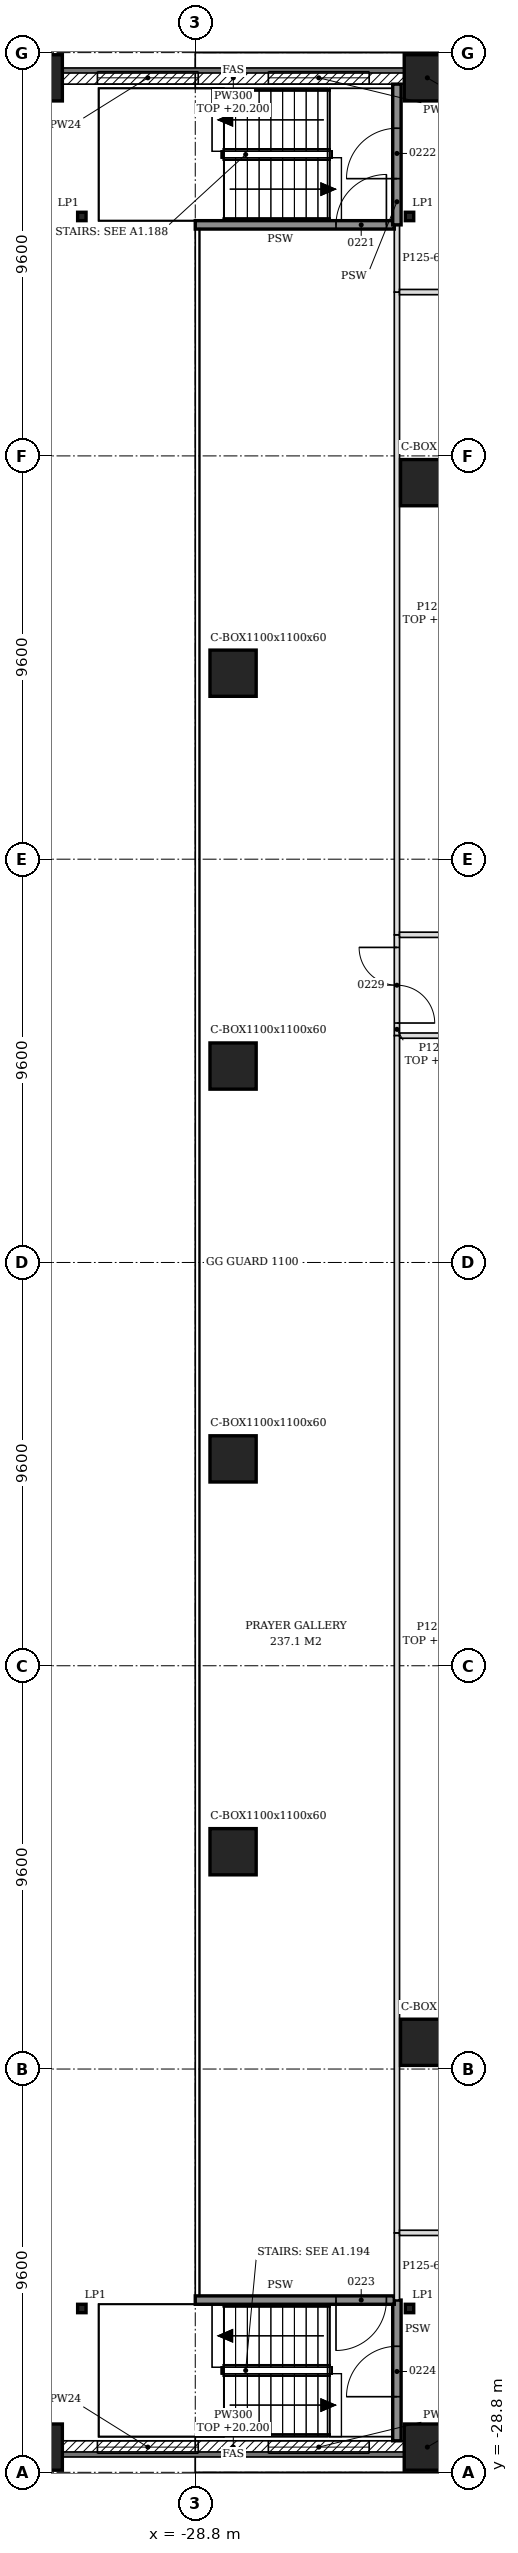
"""IFC4 building model, lengths in metres.
Left out: names, types, materials, properties, quantities, classifications, styles, units other than length and angle.
Written with IfcOpenShell. Run it as: python <this file> out.ifc"""

import sys

from ifc_helpers import new_model, si_unit, direction, frame, frame_2d, origin, origin_2d, place, context, subcontext, project, spatial, polyline, rectangle, hollow_rectangle, i_section, outline, extrude, element, fill, save


model = new_model("IFC4")
c1 = context("Model", 3, precision=1e-05, world=origin(), true_north=direction((0.0, 1.0)))
c2 = subcontext(c1, "Body", "Model", "MODEL_VIEW")
j1 = project(units=[si_unit("LENGTHUNIT", "METRE"), si_unit("PLANEANGLEUNIT", "RADIAN")], contexts=[c1])
p1 = place(None, origin())
s1 = spatial("IfcSite", under=j1, at=p1, CompositionType="ELEMENT")
p2 = place(p1, origin())
s2 = spatial("IfcBuilding", under=s1, at=p2, CompositionType="ELEMENT")
p3 = place(p2, frame((0.0, 0.0, 15.0)))
s3 = spatial("IfcBuildingStorey", under=s2, at=p3, CompositionType="ELEMENT", Elevation=15.0)
for number, where, z_axis, x_axis in (
    (1, (-32.514, -28.2, 0.0), (0.0, 0.0, 1.0), (1.0, 0.0, 0.0)),
    (2, (-23.276, -28.2, 0.0), (0.0, 0.0, 1.0), (1.0, 0.0, 0.0)),
    (3, (-23.276, 28.2, 0.0), (0.0, 0.0, 1.0), (1.0, 0.0, 0.0)),
    (4, (-32.514, 28.2, 0.0), (0.0, 0.0, 1.0), (1.0, 0.0, 0.0)),
):
    element("IfcColumn", number, at=place(p3, frame(where, z_axis=z_axis, x_axis=x_axis)), inside=s3, PredefinedType="COLUMN", context=c2, shape_type="SweptSolid", body=[
        extrude(hollow_rectangle(XDim=1.1, YDim=1.1, WallThickness=0.06, at=origin_2d()), origin(), (0.0, 0.0, 1.0), 6.0),
    ])
p4 = place(p3, frame((-31.5, 24.9, 0.0), z_axis=(0.0, 0.0, 1.0), x_axis=(1.0, 0.0, 0.0)))
e5 = element("IfcColumn", 5, at=p4, inside=s3, PredefinedType="COLUMN", context=c2, shape_type="SweptSolid", body=[
    extrude(i_section(OverallWidth=0.2, OverallDepth=0.2, WebThickness=0.009, FlangeThickness=0.015, FilletRadius=0.018, at=origin_2d()), origin(), (0.0, 0.0, 1.0), 6.0),
])
p5 = place(p3, frame((-23.7, 24.9, 0.0), z_axis=(0.0, 0.0, 1.0), x_axis=(1.0, 0.0, 0.0)))
e6 = element("IfcColumn", 6, at=p5, inside=s3, PredefinedType="COLUMN", context=c2, shape_type="SweptSolid", body=[
    extrude(i_section(OverallWidth=0.2, OverallDepth=0.2, WebThickness=0.009, FlangeThickness=0.015, FilletRadius=0.018, at=origin_2d()), origin(), (0.0, 0.0, 1.0), 2.8),
])
p6 = place(p3, frame((-31.5, -24.9, 0.0), z_axis=(0.0, 0.0, 1.0), x_axis=(1.0, 0.0, 0.0)))
e7 = element("IfcColumn", 7, at=p6, inside=s3, PredefinedType="COLUMN", context=c2, shape_type="SweptSolid", body=[
    extrude(i_section(OverallWidth=0.2, OverallDepth=0.2, WebThickness=0.009, FlangeThickness=0.015, FilletRadius=0.018, at=origin_2d()), origin(), (0.0, 0.0, 1.0), 6.0),
])
p7 = place(p3, frame((-23.7, -24.9, 0.0), z_axis=(0.0, 0.0, 1.0), x_axis=(1.0, 0.0, 0.0)))
e8 = element("IfcColumn", 8, at=p7, inside=s3, PredefinedType="COLUMN", context=c2, shape_type="SweptSolid", body=[
    extrude(i_section(OverallWidth=0.2, OverallDepth=0.2, WebThickness=0.009, FlangeThickness=0.015, FilletRadius=0.018, at=origin_2d()), origin(), (0.0, 0.0, 1.0), 2.8),
])
for number, where, z_axis, x_axis in (
    (9, (-23.364, 18.564, -0.2), (0.0, 0.0, 1.0), (1.0, 0.0, 0.0)),
    (10, (-27.9, 14.027, -0.2), (0.0, 0.0, 1.0), (1.0, 0.0, 0.0)),
    (11, (-27.9, 4.676, -0.2), (0.0, 0.0, 1.0), (1.0, 0.0, 0.0)),
    (12, (-27.9, -4.676, -0.2), (0.0, 0.0, 1.0), (1.0, 0.0, 0.0)),
    (13, (-27.9, -14.027, -0.2), (0.0, 0.0, 1.0), (1.0, 0.0, 0.0)),
    (14, (-23.364, -18.564, -0.2), (0.0, 0.0, 1.0), (1.0, 0.0, 0.0)),
):
    element("IfcColumn", number, at=place(p3, frame(where, z_axis=z_axis, x_axis=x_axis)), inside=s3, PredefinedType="COLUMN", context=c2, shape_type="SweptSolid", body=[
        extrude(hollow_rectangle(XDim=1.1, YDim=1.1, WallThickness=0.06, at=origin_2d()), origin(), (0.0, 0.0, 1.0), 6.0),
    ])
p8 = place(p3, frame((-31.964, -28.2, 0.0), z_axis=(0.0, 0.0, 1.0), x_axis=(1.0, 0.0, 0.0)))
e15 = element("IfcWall", 15, at=p8, inside=s3, PredefinedType="SOLIDWALL", context=c2, shape_type="SweptSolid", body=[
    extrude(rectangle(XDim=8.138, YDim=0.3, at=frame_2d((4.069, 0.0))), origin(), (0.0, 0.0, 1.0), 5.2),
])
p9 = place(p8, frame((0.834, 0.0, 0.9)))
e16 = element("IfcOpeningElement", 16, at=p9, cuts=e15, PredefinedType="OPENING", context=c2, shape_type="SweptSolid", body=[
    extrude(rectangle(XDim=2.4, YDim=2.4, at=frame_2d((1.2, 1.2))), frame((0.0, 0.16, 0.0), z_axis=(0.0, -1.0, 0.0), x_axis=(1.0, 0.0, 0.0)), (0.0, 0.0, 1.0), 0.32),
])
p10 = place(p8, frame((4.903, 0.0, 0.9)))
e17 = element("IfcOpeningElement", 17, at=p10, cuts=e15, PredefinedType="OPENING", context=c2, shape_type="SweptSolid", body=[
    extrude(rectangle(XDim=2.4, YDim=2.4, at=frame_2d((1.2, 1.2))), frame((0.0, 0.16, 0.0), z_axis=(0.0, -1.0, 0.0), x_axis=(1.0, 0.0, 0.0)), (0.0, 0.0, 1.0), 0.32),
])
p11 = place(p3, frame((-23.826, 28.2, 0.0), z_axis=(0.0, 0.0, 1.0), x_axis=(-1.0, 0.0, 0.0)))
e18 = element("IfcWall", 18, at=p11, inside=s3, PredefinedType="SOLIDWALL", context=c2, shape_type="SweptSolid", body=[
    extrude(rectangle(XDim=8.138, YDim=0.3, at=frame_2d((4.069, 0.0))), origin(), (0.0, 0.0, 1.0), 5.2),
])
p12 = place(p11, frame((0.834, 0.0, 0.9)))
e19 = element("IfcOpeningElement", 19, at=p12, cuts=e18, PredefinedType="OPENING", context=c2, shape_type="SweptSolid", body=[
    extrude(rectangle(XDim=2.4, YDim=2.4, at=frame_2d((1.2, 1.2))), frame((0.0, 0.16, 0.0), z_axis=(0.0, -1.0, 0.0), x_axis=(1.0, 0.0, 0.0)), (0.0, 0.0, 1.0), 0.32),
])
p13 = place(p11, frame((4.903, 0.0, 0.9)))
e20 = element("IfcOpeningElement", 20, at=p13, cuts=e18, PredefinedType="OPENING", context=c2, shape_type="SweptSolid", body=[
    extrude(rectangle(XDim=2.4, YDim=2.4, at=frame_2d((1.2, 1.2))), frame((0.0, 0.16, 0.0), z_axis=(0.0, -1.0, 0.0), x_axis=(1.0, 0.0, 0.0)), (0.0, 0.0, 1.0), 0.32),
])
p14 = place(p2, frame((0.0, 0.0, 9.0)))
s4 = spatial("IfcBuildingStorey", under=s2, at=p14, CompositionType="ELEMENT", Elevation=9.0)
p15 = place(p14, frame((-31.2, -28.05, 0.0), z_axis=(0.0, 0.0, 1.0), x_axis=(0.0, 1.0, 0.0)))
e21 = element("IfcWall", 21, at=p15, inside=s4, PredefinedType="SOLIDWALL", context=c2, shape_type="SweptSolid", body=[
    extrude(rectangle(XDim=3.25, YDim=0.2, at=frame_2d((1.625, 0.0))), origin(), (0.0, 0.0, 1.0), 11.8),
])
for number, where, z_axis, x_axis in (
    (22, (-31.3, -24.7, 0.0), (0.0, 0.0, 1.0), (1.0, 0.0, 0.0)),
    (23, (-31.3, 24.7, 0.0), (0.0, 0.0, 1.0), (1.0, 0.0, 0.0)),
):
    element("IfcWall", number, at=place(p14, frame(where, z_axis=z_axis, x_axis=x_axis)), inside=s4, PredefinedType="SOLIDWALL", context=c2, shape_type="SweptSolid", body=[
        extrude(rectangle(XDim=2.5, YDim=0.2, at=frame_2d((1.25, 0.0))), origin(), (0.0, 0.0, 1.0), 11.8),
    ])
p16 = place(p14, frame((-31.2, 24.8, 0.0), z_axis=(0.0, 0.0, 1.0), x_axis=(0.0, 1.0, 0.0)))
e24 = element("IfcWall", 24, at=p16, inside=s4, PredefinedType="SOLIDWALL", context=c2, shape_type="SweptSolid", body=[
    extrude(rectangle(XDim=3.25, YDim=0.2, at=frame_2d((1.625, 0.0))), origin(), (0.0, 0.0, 1.0), 11.8),
])
p17 = place(p3, frame((-24.0, -28.05, 0.0), z_axis=(0.0, 0.0, 1.0), x_axis=(0.0, 1.0, 0.0)))
e25 = element("IfcWall", 25, at=p17, inside=s3, PredefinedType="SOLIDWALL", context=c2, shape_type="SweptSolid", body=[
    extrude(rectangle(XDim=3.35, YDim=0.2, at=frame_2d((1.675, 0.0))), origin(), (0.0, 0.0, 1.0), 5.8),
])
p18 = place(p17, frame((1.05, 0.0, 0.0)))
e26 = element("IfcOpeningElement", 26, at=p18, cuts=e25, PredefinedType="OPENING", context=c2, shape_type="SweptSolid", body=[
    extrude(rectangle(XDim=1.2, YDim=2.1, at=frame_2d((0.6, 1.05))), frame((0.0, 0.11, 0.0), z_axis=(0.0, -1.0, 0.0), x_axis=(1.0, 0.0, 0.0)), (0.0, 0.0, 1.0), 0.22),
])
p19 = place(p3, frame((-28.8, -24.7, 0.0), z_axis=(0.0, 0.0, 1.0), x_axis=(1.0, 0.0, 0.0)))
e27 = element("IfcWall", 27, at=p19, inside=s3, PredefinedType="SOLIDWALL", context=c2, shape_type="SweptSolid", body=[
    extrude(rectangle(XDim=4.738, YDim=0.2, at=frame_2d((2.369, 0.0))), origin(), (0.0, 0.0, 1.0), 5.8),
])
p20 = place(p19, frame((3.35, 0.0, 0.0)))
e28 = element("IfcOpeningElement", 28, at=p20, cuts=e27, PredefinedType="OPENING", context=c2, shape_type="SweptSolid", body=[
    extrude(rectangle(XDim=1.2, YDim=2.1, at=frame_2d((0.6, 1.05))), frame((0.0, 0.11, 0.0), z_axis=(0.0, -1.0, 0.0), x_axis=(1.0, 0.0, 0.0)), (0.0, 0.0, 1.0), 0.22),
])
p21 = place(p3, frame((-24.0, -24.7, 0.0), z_axis=(0.0, 0.0, 1.0), x_axis=(0.0, 1.0, 0.0)))
e29 = element("IfcWall", 29, at=p21, inside=s3, PredefinedType="PARTITIONING", context=c2, shape_type="SweptSolid", body=[
    extrude(rectangle(XDim=1.6, YDim=0.125, at=frame_2d((0.8, 0.0))), origin(), (0.0, 0.0, 1.0), 5.8),
])
p22 = place(p3, frame((-24.0, -23.1, 0.0), z_axis=(0.0, 0.0, 1.0), x_axis=(0.0, 1.0, 0.0)))
e30 = element("IfcWall", 30, at=p22, inside=s3, PredefinedType="PARTITIONING", context=c2, shape_type="SweptSolid", body=[
    extrude(outline(polyline([(0.0, 0.0), (28.5, 0.0), (28.5, 5.28), (23.25, 5.28), (23.248, 5.08), (22.95, 5.08), (22.948, 5.28), (13.65, 5.28), (13.648, 5.08), (13.35, 5.08), (13.348, 5.28), (4.05, 5.28), (4.048, 5.18), (3.75, 5.18), (3.748, 5.28), (0.0, 5.28), (0.0, 0.0)])), frame((0.0, 0.062, 0.0), z_axis=(0.0, -1.0, 0.0), x_axis=(1.0, 0.0, 0.0)), (0.0, 0.0, 1.0), 0.125),
])
p23 = place(p3, frame((-23.938, -23.1, 0.0), z_axis=(0.0, 0.0, 1.0), x_axis=(1.0, 0.0, 0.0)))
e31 = element("IfcWall", 31, at=p23, inside=s3, PredefinedType="PARTITIONING", context=c2, shape_type="SweptSolid", body=[
    extrude(rectangle(XDim=4.56, YDim=0.125, at=frame_2d((2.28, 0.0))), origin(), (0.0, 0.0, 1.0), 5.8),
])
p24 = place(p3, frame((-24.0, 5.4, 0.0), z_axis=(0.0, 0.0, 1.0), x_axis=(0.0, 1.0, 0.0)))
e32 = element("IfcWall", 32, at=p24, inside=s3, PredefinedType="PARTITIONING", context=c2, shape_type="SweptSolid", body=[
    extrude(rectangle(XDim=2.4, YDim=0.125, at=frame_2d((1.2, 0.0))), origin(), (0.0, 0.0, 1.0), 5.28),
])
p25 = place(p24, frame((0.3, 0.0, 0.0)))
e33 = element("IfcOpeningElement", 33, at=p25, cuts=e32, PredefinedType="OPENING", context=c2, shape_type="SweptSolid", body=[
    extrude(rectangle(XDim=1.8, YDim=2.1, at=frame_2d((0.9, 1.05))), frame((0.0, 0.073, 0.0), z_axis=(0.0, -1.0, 0.0), x_axis=(1.0, 0.0, 0.0)), (0.0, 0.0, 1.0), 0.145),
])
p26 = place(p3, frame((-23.938, 5.4, 0.0), z_axis=(0.0, 0.0, 1.0), x_axis=(1.0, 0.0, 0.0)))
e34 = element("IfcWall", 34, at=p26, inside=s3, PredefinedType="PARTITIONING", context=c2, shape_type="SweptSolid", body=[
    extrude(outline(polyline([(0.0, 0.0), (19.2, 0.0), (19.2, 5.18), (18.988, 5.18), (18.986, 5.8), (14.438, 5.8), (14.436, 5.28), (14.238, 5.28), (14.236, 5.8), (9.637, 5.8), (9.635, 5.28), (9.438, 5.28), (9.436, 5.8), (4.837, 5.8), (4.835, 5.28), (4.637, 5.28), (4.635, 5.8), (0.038, 5.8), (0.035, 5.28), (0.0, 5.28), (0.0, 0.0)])), frame((0.0, 0.062, 0.0), z_axis=(0.0, -1.0, 0.0), x_axis=(1.0, 0.0, 0.0)), (0.0, 0.0, 1.0), 0.125),
])
p27 = place(p26, frame((2.637, 0.0, 0.0)))
e35 = element("IfcOpeningElement", 35, at=p27, cuts=e34, PredefinedType="OPENING", context=c2, shape_type="SweptSolid", body=[
    extrude(rectangle(XDim=1.8, YDim=2.1, at=frame_2d((0.9, 1.05))), frame((0.0, 0.073, 0.0), z_axis=(0.0, -1.0, 0.0), x_axis=(1.0, 0.0, 0.0)), (0.0, 0.0, 1.0), 0.145),
])
p28 = place(p26, frame((9.837, 0.0, 0.0)))
e36 = element("IfcOpeningElement", 36, at=p28, cuts=e34, PredefinedType="OPENING", context=c2, shape_type="SweptSolid", body=[
    extrude(rectangle(XDim=1.8, YDim=2.1, at=frame_2d((0.9, 1.05))), frame((0.0, 0.073, 0.0), z_axis=(0.0, -1.0, 0.0), x_axis=(1.0, 0.0, 0.0)), (0.0, 0.0, 1.0), 0.145),
])
p29 = place(p26, frame((16.288, 0.0, 0.0)))
e37 = element("IfcOpeningElement", 37, at=p29, cuts=e34, PredefinedType="OPENING", context=c2, shape_type="SweptSolid", body=[
    extrude(rectangle(XDim=0.9, YDim=2.1, at=frame_2d((0.45, 1.05))), frame((0.0, 0.073, 0.0), z_axis=(0.0, -1.0, 0.0), x_axis=(1.0, 0.0, 0.0)), (0.0, 0.0, 1.0), 0.145),
])
p30 = place(p3, frame((-24.0, 7.8, 0.0), z_axis=(0.0, 0.0, 1.0), x_axis=(0.0, 1.0, 0.0)))
e38 = element("IfcWall", 38, at=p30, inside=s3, PredefinedType="PARTITIONING", context=c2, shape_type="SweptSolid", body=[
    extrude(outline(polyline([(0.0, 0.0), (15.3, 0.0), (15.3, 5.28), (11.55, 5.28), (11.548, 5.18), (11.25, 5.18), (11.248, 5.28), (1.95, 5.28), (1.948, 5.08), (1.65, 5.08), (1.648, 5.28), (0.0, 5.28), (0.0, 0.0)])), frame((0.0, 0.062, 0.0), z_axis=(0.0, -1.0, 0.0), x_axis=(1.0, 0.0, 0.0)), (0.0, 0.0, 1.0), 0.125),
])
p31 = place(p3, frame((-23.938, 7.8, 0.0), z_axis=(0.0, 0.0, 1.0), x_axis=(1.0, 0.0, 0.0)))
e39 = element("IfcWall", 39, at=p31, inside=s3, PredefinedType="PARTITIONING", context=c2, shape_type="SweptSolid", body=[
    extrude(outline(polyline([(0.0, 0.0), (19.2, 0.0), (19.2, 5.18), (18.988, 5.18), (18.986, 5.8), (14.438, 5.8), (14.436, 5.28), (14.238, 5.28), (14.236, 5.8), (9.637, 5.8), (9.635, 5.28), (9.438, 5.28), (9.436, 5.8), (4.837, 5.8), (4.835, 5.28), (4.637, 5.28), (4.635, 5.8), (0.038, 5.8), (0.035, 5.28), (0.0, 5.28), (0.0, 0.0)])), frame((0.0, 0.062, 0.0), z_axis=(0.0, -1.0, 0.0), x_axis=(1.0, 0.0, 0.0)), (0.0, 0.0, 1.0), 0.125),
])
p32 = place(p31, frame((4.738, 0.0, 0.0)))
e40 = element("IfcOpeningElement", 40, at=p32, cuts=e39, PredefinedType="OPENING", context=c2, shape_type="SweptSolid", body=[
    extrude(rectangle(XDim=1.8, YDim=2.1, at=frame_2d((0.9, 1.05))), frame((0.0, 0.073, 0.0), z_axis=(0.0, -1.0, 0.0), x_axis=(1.0, 0.0, 0.0)), (0.0, 0.0, 1.0), 0.145),
])
p33 = place(p31, frame((14.788, 0.0, 0.0)))
e41 = element("IfcOpeningElement", 41, at=p33, cuts=e39, PredefinedType="OPENING", context=c2, shape_type="SweptSolid", body=[
    extrude(rectangle(XDim=0.9, YDim=2.1, at=frame_2d((0.45, 1.05))), frame((0.0, 0.073, 0.0), z_axis=(0.0, -1.0, 0.0), x_axis=(1.0, 0.0, 0.0)), (0.0, 0.0, 1.0), 0.145),
])
p34 = place(p3, frame((-24.0, 23.1, 0.0), z_axis=(0.0, 0.0, 1.0), x_axis=(0.0, 1.0, 0.0)))
e42 = element("IfcWall", 42, at=p34, inside=s3, PredefinedType="PARTITIONING", context=c2, shape_type="SweptSolid", body=[
    extrude(rectangle(XDim=1.6, YDim=0.125, at=frame_2d((0.8, 0.0))), origin(), (0.0, 0.0, 1.0), 5.8),
])
p35 = place(p3, frame((-23.938, 23.1, 0.0), z_axis=(0.0, 0.0, 1.0), x_axis=(1.0, 0.0, 0.0)))
e43 = element("IfcWall", 43, at=p35, inside=s3, PredefinedType="PARTITIONING", context=c2, shape_type="SweptSolid", body=[
    extrude(rectangle(XDim=4.56, YDim=0.125, at=frame_2d((2.28, 0.0))), origin(), (0.0, 0.0, 1.0), 5.8),
])
p36 = place(p3, frame((-28.8, 24.7, 0.0), z_axis=(0.0, 0.0, 1.0), x_axis=(1.0, 0.0, 0.0)))
e44 = element("IfcWall", 44, at=p36, inside=s3, PredefinedType="SOLIDWALL", context=c2, shape_type="SweptSolid", body=[
    extrude(rectangle(XDim=4.738, YDim=0.2, at=frame_2d((2.369, 0.0))), origin(), (0.0, 0.0, 1.0), 5.8),
])
p37 = place(p36, frame((3.35, 0.0, 0.0)))
e45 = element("IfcOpeningElement", 45, at=p37, cuts=e44, PredefinedType="OPENING", context=c2, shape_type="SweptSolid", body=[
    extrude(rectangle(XDim=1.2, YDim=2.1, at=frame_2d((0.6, 1.05))), frame((0.0, 0.11, 0.0), z_axis=(0.0, -1.0, 0.0), x_axis=(1.0, 0.0, 0.0)), (0.0, 0.0, 1.0), 0.22),
])
p38 = place(p3, frame((-24.0, 24.7, 0.0), z_axis=(0.0, 0.0, 1.0), x_axis=(0.0, 1.0, 0.0)))
e46 = element("IfcWall", 46, at=p38, inside=s3, PredefinedType="SOLIDWALL", context=c2, shape_type="SweptSolid", body=[
    extrude(rectangle(XDim=3.35, YDim=0.2, at=frame_2d((1.675, 0.0))), origin(), (0.0, 0.0, 1.0), 5.8),
])
p39 = place(p38, frame((1.1, 0.0, 0.0)))
e47 = element("IfcOpeningElement", 47, at=p39, cuts=e46, PredefinedType="OPENING", context=c2, shape_type="SweptSolid", body=[
    extrude(rectangle(XDim=1.2, YDim=2.1, at=frame_2d((0.6, 1.05))), frame((0.0, 0.11, 0.0), z_axis=(0.0, -1.0, 0.0), x_axis=(1.0, 0.0, 0.0)), (0.0, 0.0, 1.0), 0.22),
])
p40 = place(p9, origin())
e48 = element("IfcWindow", 48, at=p40, inside=s3, PartitioningType="SINGLE_PANEL", PredefinedType="WINDOW", context=c2, shape_type="SweptSolid", body=[
    extrude(rectangle(XDim=2.4, YDim=2.4, at=frame_2d((1.2, 1.2))), frame((0.0, 0.03, 0.0), z_axis=(0.0, -1.0, 0.0), x_axis=(1.0, 0.0, 0.0)), (0.0, 0.0, 1.0), 0.06),
])
fill(e16, e48)
p41 = place(p10, origin())
e49 = element("IfcWindow", 49, at=p41, inside=s3, PartitioningType="SINGLE_PANEL", PredefinedType="WINDOW", context=c2, shape_type="SweptSolid", body=[
    extrude(rectangle(XDim=2.4, YDim=2.4, at=frame_2d((1.2, 1.2))), frame((0.0, 0.03, 0.0), z_axis=(0.0, -1.0, 0.0), x_axis=(1.0, 0.0, 0.0)), (0.0, 0.0, 1.0), 0.06),
])
fill(e17, e49)
p42 = place(p12, origin())
e50 = element("IfcWindow", 50, at=p42, inside=s3, PartitioningType="SINGLE_PANEL", PredefinedType="WINDOW", context=c2, shape_type="SweptSolid", body=[
    extrude(rectangle(XDim=2.4, YDim=2.4, at=frame_2d((1.2, 1.2))), frame((0.0, 0.03, 0.0), z_axis=(0.0, -1.0, 0.0), x_axis=(1.0, 0.0, 0.0)), (0.0, 0.0, 1.0), 0.06),
])
fill(e19, e50)
p43 = place(p13, origin())
e51 = element("IfcWindow", 51, at=p43, inside=s3, PartitioningType="SINGLE_PANEL", PredefinedType="WINDOW", context=c2, shape_type="SweptSolid", body=[
    extrude(rectangle(XDim=2.4, YDim=2.4, at=frame_2d((1.2, 1.2))), frame((0.0, 0.03, 0.0), z_axis=(0.0, -1.0, 0.0), x_axis=(1.0, 0.0, 0.0)), (0.0, 0.0, 1.0), 0.06),
])
fill(e20, e51)
p44 = place(p37, origin())
e52 = element("IfcDoor", 52, at=p44, inside=s3, OperationType="SINGLE_SWING_RIGHT", PredefinedType="DOOR", context=c2, shape_type="SweptSolid", body=[
    extrude(rectangle(XDim=1.2, YDim=2.1, at=frame_2d((0.6, 1.05))), frame((0.0, 0.025, 0.0), z_axis=(0.0, -1.0, 0.0), x_axis=(1.0, 0.0, 0.0)), (0.0, 0.0, 1.0), 0.05),
])
fill(e45, e52)
p45 = place(p39, origin())
e53 = element("IfcDoor", 53, at=p45, inside=s3, OperationType="SINGLE_SWING_LEFT", PredefinedType="DOOR", context=c2, shape_type="SweptSolid", body=[
    extrude(rectangle(XDim=1.2, YDim=2.1, at=frame_2d((0.6, 1.05))), frame((0.0, 0.025, 0.0), z_axis=(0.0, -1.0, 0.0), x_axis=(1.0, 0.0, 0.0)), (0.0, 0.0, 1.0), 0.05),
])
fill(e47, e53)
p46 = place(p20, frame((1.2, 0.0, 0.0), z_axis=(0.0, 0.0, 1.0), x_axis=(-1.0, 0.0, 0.0)))
e54 = element("IfcDoor", 54, at=p46, inside=s3, OperationType="SINGLE_SWING_RIGHT", PredefinedType="DOOR", context=c2, shape_type="SweptSolid", body=[
    extrude(rectangle(XDim=1.2, YDim=2.1, at=frame_2d((0.6, 1.05))), frame((0.0, 0.025, 0.0), z_axis=(0.0, -1.0, 0.0), x_axis=(1.0, 0.0, 0.0)), (0.0, 0.0, 1.0), 0.05),
])
fill(e28, e54)
p47 = place(p18, origin())
e55 = element("IfcDoor", 55, at=p47, inside=s3, OperationType="SINGLE_SWING_LEFT", PredefinedType="DOOR", context=c2, shape_type="SweptSolid", body=[
    extrude(rectangle(XDim=1.2, YDim=2.1, at=frame_2d((0.6, 1.05))), frame((0.0, 0.025, 0.0), z_axis=(0.0, -1.0, 0.0), x_axis=(1.0, 0.0, 0.0)), (0.0, 0.0, 1.0), 0.05),
])
fill(e26, e55)
p48 = place(p25, frame((1.8, 0.0, 0.0), z_axis=(0.0, 0.0, 1.0), x_axis=(-1.0, 0.0, 0.0)))
e56 = element("IfcDoor", 56, at=p48, inside=s3, OperationType="DOUBLE_DOOR_SINGLE_SWING", PredefinedType="DOOR", context=c2, shape_type="SweptSolid", body=[
    extrude(rectangle(XDim=1.8, YDim=2.1, at=frame_2d((0.9, 1.05))), frame((0.0, 0.025, 0.0), z_axis=(0.0, -1.0, 0.0), x_axis=(1.0, 0.0, 0.0)), (0.0, 0.0, 1.0), 0.05),
])
fill(e33, e56)
save(model, sys.argv[1])
